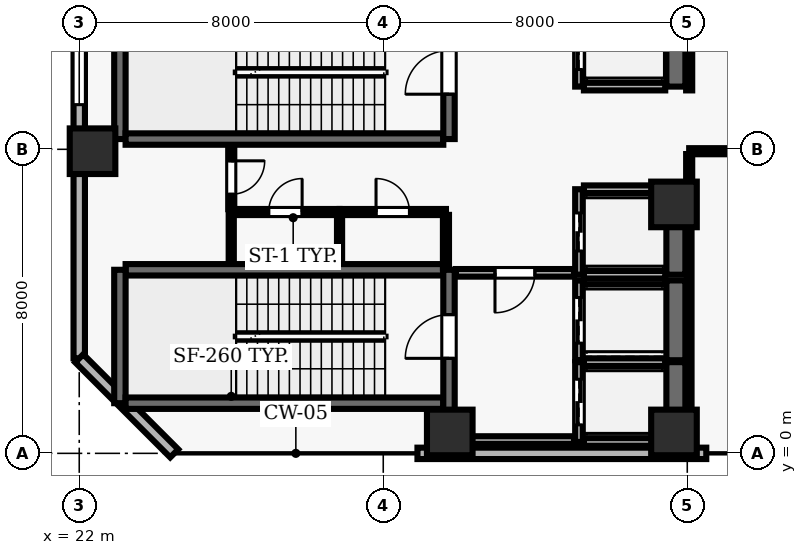
"""IFC4 building model, lengths in metres.
Left out: names, types, materials, properties, quantities, classifications, styles, units other than length and angle.
Written with IfcOpenShell. Run it as: python <this file> out.ifc"""

import sys

from ifc_helpers import new_model, si_unit, direction, frame, frame_2d, origin, origin_2d, place, context, subcontext, project, spatial, rectangle, extrude, element, fill, save


model = new_model("IFC4")
c1 = context("Model", 3, precision=1e-05, world=origin(), true_north=direction((0.0, 1.0)))
c2 = subcontext(c1, "Body", "Model", "MODEL_VIEW")
j1 = project(units=[si_unit("LENGTHUNIT", "METRE"), si_unit("PLANEANGLEUNIT", "RADIAN")], contexts=[c1])
p1 = place(None, origin())
s1 = spatial("IfcSite", under=j1, at=p1, CompositionType="ELEMENT")
p2 = place(p1, origin())
s2 = spatial("IfcBuilding", under=s1, at=p2, CompositionType="ELEMENT")
p3 = place(p2, frame((0.0, 0.0, 98.4)))
s3 = spatial("IfcBuildingStorey", under=s2, at=p3, CompositionType="ELEMENT", Elevation=98.4)
for number, where, z_axis, x_axis in (
    (1, (31.75, 0.55, 0.0), (0.0, 0.0, 1.0), (1.0, 0.0, 0.0)),
    (2, (37.65, 0.55, 0.0), (0.0, 0.0, 1.0), (1.0, 0.0, 0.0)),
    (3, (22.35, 7.95, 0.0), (0.0, 0.0, 1.0), (1.0, 0.0, 0.0)),
    (4, (37.65, 6.55, 0.0), (0.0, 0.0, 1.0), (1.0, 0.0, 0.0)),
):
    element("IfcColumn", number, at=place(p3, frame(where, z_axis=z_axis, x_axis=x_axis)), inside=s3, PredefinedType="COLUMN", context=c2, shape_type="SweptSolid", body=[
        extrude(rectangle(XDim=1.2, YDim=1.2, at=origin_2d()), origin(), (0.0, 0.0, 1.0), 5.0),
    ])
p4 = place(p3, frame((30.9, 0.0, 0.0), z_axis=(0.0, 0.0, 1.0), x_axis=(1.0, 0.0, 0.0)))
e5 = element("IfcWall", 5, at=p4, inside=s3, PredefinedType="SOLIDWALL", context=c2, shape_type="SweptSolid", body=[
    extrude(rectangle(XDim=7.6, YDim=0.3, at=frame_2d((3.8, 0.0))), origin(), (0.0, 0.0, 1.0), 4.79),
])
p5 = place(p3, frame((22.0, 46.1, 0.0), z_axis=(0.0, 0.0, 1.0), x_axis=(0.0, -1.0, 0.0)))
e6 = element("IfcWall", 6, at=p5, inside=s3, PredefinedType="SOLIDWALL", context=c2, shape_type="SweptSolid", body=[
    extrude(rectangle(XDim=43.6, YDim=0.3, at=frame_2d((21.8, 0.0))), origin(), (0.0, 0.0, 1.0), 4.79),
])
p6 = place(p5, frame((12.7, 0.0, 0.0)))
e7 = element("IfcOpeningElement", 7, at=p6, cuts=e6, PredefinedType="OPENING", context=c2, shape_type="SweptSolid", body=[
    extrude(rectangle(XDim=1.0, YDim=2.2, at=frame_2d((0.5, 1.1))), frame((0.0, 0.16, 0.0), z_axis=(0.0, -1.0, 0.0), x_axis=(1.0, 0.0, 0.0)), (0.0, 0.0, 1.0), 0.32),
])
p7 = place(p5, frame((1.225, 0.0, 0.9)))
e8 = element("IfcOpeningElement", 8, at=p7, cuts=e6, PredefinedType="OPENING", context=c2, shape_type="SweptSolid", body=[
    extrude(rectangle(XDim=3.0, YDim=2.2, at=frame_2d((1.5, 1.1))), frame((0.0, 0.16, 0.0), z_axis=(0.0, -1.0, 0.0), x_axis=(1.0, 0.0, 0.0)), (0.0, 0.0, 1.0), 0.32),
])
p8 = place(p5, frame((6.675, 0.0, 0.9)))
e9 = element("IfcOpeningElement", 9, at=p8, cuts=e6, PredefinedType="OPENING", context=c2, shape_type="SweptSolid", body=[
    extrude(rectangle(XDim=3.0, YDim=2.2, at=frame_2d((1.5, 1.1))), frame((0.0, 0.16, 0.0), z_axis=(0.0, -1.0, 0.0), x_axis=(1.0, 0.0, 0.0)), (0.0, 0.0, 1.0), 0.32),
])
p9 = place(p5, frame((23.475, 0.0, 0.9)))
e10 = element("IfcOpeningElement", 10, at=p9, cuts=e6, PredefinedType="OPENING", context=c2, shape_type="SweptSolid", body=[
    extrude(rectangle(XDim=3.0, YDim=2.2, at=frame_2d((1.5, 1.1))), frame((0.0, 0.16, 0.0), z_axis=(0.0, -1.0, 0.0), x_axis=(1.0, 0.0, 0.0)), (0.0, 0.0, 1.0), 0.32),
])
p10 = place(p5, frame((33.925, 0.0, 0.9)))
e11 = element("IfcOpeningElement", 11, at=p10, cuts=e6, PredefinedType="OPENING", context=c2, shape_type="SweptSolid", body=[
    extrude(rectangle(XDim=3.0, YDim=2.2, at=frame_2d((1.5, 1.1))), frame((0.0, 0.16, 0.0), z_axis=(0.0, -1.0, 0.0), x_axis=(1.0, 0.0, 0.0)), (0.0, 0.0, 1.0), 0.32),
])
p11 = place(p3, frame((22.0, 2.5, 0.0), z_axis=(0.0, 0.0, 1.0), x_axis=(0.707106781187, -0.707106781187, 0.0)))
e12 = element("IfcWall", 12, at=p11, inside=s3, PredefinedType="SOLIDWALL", context=c2, shape_type="SweptSolid", body=[
    extrude(rectangle(XDim=3.536, YDim=0.3, at=frame_2d((1.768, 0.0))), origin(), (0.0, 0.0, 1.0), 4.79),
])
p12 = place(p3, frame((31.58, 4.83, 0.0), z_axis=(0.0, 0.0, 1.0), x_axis=(-1.0, 0.0, 0.0)))
e13 = element("IfcWall", 13, at=p12, inside=s3, PredefinedType="SHEAR", context=c2, shape_type="SweptSolid", body=[
    extrude(rectangle(XDim=8.36, YDim=0.3, at=frame_2d((4.18, 0.0))), origin(), (0.0, 0.0, 1.0), 4.79),
])
p13 = place(p3, frame((23.07, 4.83, 0.0), z_axis=(0.0, 0.0, 1.0), x_axis=(0.0, -1.0, 0.0)))
e14 = element("IfcWall", 14, at=p13, inside=s3, PredefinedType="SHEAR", context=c2, shape_type="SweptSolid", body=[
    extrude(rectangle(XDim=3.51, YDim=0.3, at=frame_2d((1.755, 0.0))), origin(), (0.0, 0.0, 1.0), 4.79),
])
p14 = place(p3, frame((23.22, 1.32, 0.0), z_axis=(0.0, 0.0, 1.0), x_axis=(1.0, 0.0, 0.0)))
e15 = element("IfcWall", 15, at=p14, inside=s3, PredefinedType="SHEAR", context=c2, shape_type="SweptSolid", body=[
    extrude(rectangle(XDim=8.36, YDim=0.3, at=frame_2d((4.18, 0.0))), origin(), (0.0, 0.0, 1.0), 4.79),
])
p15 = place(p3, frame((31.73, 0.96, 0.0), z_axis=(0.0, 0.0, 1.0), x_axis=(0.0, 1.0, 0.0)))
e16 = element("IfcWall", 16, at=p15, inside=s3, PredefinedType="SHEAR", context=c2, shape_type="SweptSolid", body=[
    extrude(rectangle(XDim=3.87, YDim=0.3, at=frame_2d((1.935, 0.0))), origin(), (0.0, 0.0, 1.0), 4.79),
])
p16 = place(p15, frame((1.54, 0.0, 0.0)))
e17 = element("IfcOpeningElement", 17, at=p16, cuts=e16, PredefinedType="OPENING", context=c2, shape_type="SweptSolid", body=[
    extrude(rectangle(XDim=1.15, YDim=2.15, at=frame_2d((0.575, 1.075))), frame((0.0, 0.16, 0.0), z_axis=(0.0, -1.0, 0.0), x_axis=(1.0, 0.0, 0.0)), (0.0, 0.0, 1.0), 0.32),
])
p17 = place(p3, frame((23.07, 11.78, 0.0), z_axis=(0.0, 0.0, 1.0), x_axis=(0.0, -1.0, 0.0)))
e18 = element("IfcWall", 18, at=p17, inside=s3, PredefinedType="SHEAR", context=c2, shape_type="SweptSolid", body=[
    extrude(rectangle(XDim=3.51, YDim=0.3, at=frame_2d((1.755, 0.0))), origin(), (0.0, 0.0, 1.0), 4.79),
])
p18 = place(p3, frame((23.22, 8.27, 0.0), z_axis=(0.0, 0.0, 1.0), x_axis=(1.0, 0.0, 0.0)))
e19 = element("IfcWall", 19, at=p18, inside=s3, PredefinedType="SHEAR", context=c2, shape_type="SweptSolid", body=[
    extrude(rectangle(XDim=8.36, YDim=0.3, at=frame_2d((4.18, 0.0))), origin(), (0.0, 0.0, 1.0), 4.79),
])
p19 = place(p3, frame((31.73, 8.27, 0.0), z_axis=(0.0, 0.0, 1.0), x_axis=(0.0, 1.0, 0.0)))
e20 = element("IfcWall", 20, at=p19, inside=s3, PredefinedType="SHEAR", context=c2, shape_type="SweptSolid", body=[
    extrude(rectangle(XDim=3.51, YDim=0.3, at=frame_2d((1.755, 0.0))), origin(), (0.0, 0.0, 1.0), 4.79),
])
p20 = place(p19, frame((1.18, 0.0, 0.0)))
e21 = element("IfcOpeningElement", 21, at=p20, cuts=e20, PredefinedType="OPENING", context=c2, shape_type="SweptSolid", body=[
    extrude(rectangle(XDim=1.15, YDim=2.15, at=frame_2d((0.575, 1.075))), frame((0.0, 0.16, 0.0), z_axis=(0.0, -1.0, 0.0), x_axis=(1.0, 0.0, 0.0)), (0.0, 0.0, 1.0), 0.32),
])
p21 = place(p3, frame((35.15, 2.4, 0.0), z_axis=(0.0, 0.0, 1.0), x_axis=(0.0, -1.0, 0.0)))
e22 = element("IfcWall", 22, at=p21, inside=s3, PredefinedType="SOLIDWALL", context=c2, shape_type="SweptSolid", body=[
    extrude(rectangle(XDim=2.1, YDim=0.2, at=frame_2d((1.05, 0.0))), origin(), (0.0, 0.0, 1.0), 4.79),
])
p22 = place(p21, frame((0.45, 0.0, 0.0)))
e23 = element("IfcOpeningElement", 23, at=p22, cuts=e22, PredefinedType="OPENING", context=c2, shape_type="SweptSolid", body=[
    extrude(rectangle(XDim=1.2, YDim=2.15, at=frame_2d((0.6, 1.075))), frame((0.0, 0.11, 0.0), z_axis=(0.0, -1.0, 0.0), x_axis=(1.0, 0.0, 0.0)), (0.0, 0.0, 1.0), 0.22),
])
p23 = place(p3, frame((37.7, 0.3, 0.0), z_axis=(0.0, 0.0, 1.0), x_axis=(0.0, 1.0, 0.0)))
e24 = element("IfcWall", 24, at=p23, inside=s3, PredefinedType="SHEAR", context=c2, shape_type="SweptSolid", body=[
    extrude(rectangle(XDim=2.1, YDim=0.5, at=frame_2d((1.05, 0.0))), origin(), (0.0, 0.0, 1.0), 4.79),
])
for number, where, z_axis, x_axis in (
    (25, (35.28, 0.3, 0.0), (0.0, 0.0, 1.0), (1.0, 0.0, 0.0)),
    (26, (37.42, 2.4, 0.0), (0.0, 0.0, 1.0), (-1.0, 0.0, 0.0)),
):
    element("IfcWall", number, at=place(p3, frame(where, z_axis=z_axis, x_axis=x_axis)), inside=s3, PredefinedType="SOLIDWALL", context=c2, shape_type="SweptSolid", body=[
        extrude(rectangle(XDim=2.14, YDim=0.2, at=frame_2d((1.07, 0.0))), origin(), (0.0, 0.0, 1.0), 4.79),
    ])
p24 = place(p3, frame((35.15, 4.55, 0.0), z_axis=(0.0, 0.0, 1.0), x_axis=(0.0, -1.0, 0.0)))
e27 = element("IfcWall", 27, at=p24, inside=s3, PredefinedType="SOLIDWALL", context=c2, shape_type="SweptSolid", body=[
    extrude(rectangle(XDim=2.1, YDim=0.2, at=frame_2d((1.05, 0.0))), origin(), (0.0, 0.0, 1.0), 4.79),
])
p25 = place(p24, frame((0.45, 0.0, 0.0)))
e28 = element("IfcOpeningElement", 28, at=p25, cuts=e27, PredefinedType="OPENING", context=c2, shape_type="SweptSolid", body=[
    extrude(rectangle(XDim=1.2, YDim=2.15, at=frame_2d((0.6, 1.075))), frame((0.0, 0.11, 0.0), z_axis=(0.0, -1.0, 0.0), x_axis=(1.0, 0.0, 0.0)), (0.0, 0.0, 1.0), 0.22),
])
p26 = place(p3, frame((37.7, 2.45, 0.0), z_axis=(0.0, 0.0, 1.0), x_axis=(0.0, 1.0, 0.0)))
e29 = element("IfcWall", 29, at=p26, inside=s3, PredefinedType="SHEAR", context=c2, shape_type="SweptSolid", body=[
    extrude(rectangle(XDim=2.1, YDim=0.5, at=frame_2d((1.05, 0.0))), origin(), (0.0, 0.0, 1.0), 4.79),
])
p27 = place(p3, frame((37.42, 4.55, 0.0), z_axis=(0.0, 0.0, 1.0), x_axis=(-1.0, 0.0, 0.0)))
e30 = element("IfcWall", 30, at=p27, inside=s3, PredefinedType="SOLIDWALL", context=c2, shape_type="SweptSolid", body=[
    extrude(rectangle(XDim=2.14, YDim=0.2, at=frame_2d((1.07, 0.0))), origin(), (0.0, 0.0, 1.0), 4.79),
])
p28 = place(p3, frame((35.15, 6.95, 0.0), z_axis=(0.0, 0.0, 1.0), x_axis=(0.0, -1.0, 0.0)))
e31 = element("IfcWall", 31, at=p28, inside=s3, PredefinedType="SOLIDWALL", context=c2, shape_type="SweptSolid", body=[
    extrude(rectangle(XDim=2.25, YDim=0.2, at=frame_2d((1.125, 0.0))), origin(), (0.0, 0.0, 1.0), 4.79),
])
p29 = place(p28, frame((0.625, 0.0, 0.0)))
e32 = element("IfcOpeningElement", 32, at=p29, cuts=e31, PredefinedType="OPENING", context=c2, shape_type="SweptSolid", body=[
    extrude(rectangle(XDim=1.0, YDim=2.1, at=frame_2d((0.5, 1.05))), frame((0.0, 0.11, 0.0), z_axis=(0.0, -1.0, 0.0), x_axis=(1.0, 0.0, 0.0)), (0.0, 0.0, 1.0), 0.22),
])
p30 = place(p3, frame((37.7, 4.7, 0.0), z_axis=(0.0, 0.0, 1.0), x_axis=(0.0, 1.0, 0.0)))
e33 = element("IfcWall", 33, at=p30, inside=s3, PredefinedType="SHEAR", context=c2, shape_type="SweptSolid", body=[
    extrude(rectangle(XDim=2.25, YDim=0.5, at=frame_2d((1.125, 0.0))), origin(), (0.0, 0.0, 1.0), 4.79),
])
for number, where, z_axis, x_axis in (
    (34, (35.28, 4.7, 0.0), (0.0, 0.0, 1.0), (1.0, 0.0, 0.0)),
    (35, (37.42, 6.95, 0.0), (0.0, 0.0, 1.0), (-1.0, 0.0, 0.0)),
):
    element("IfcWall", number, at=place(p3, frame(where, z_axis=z_axis, x_axis=x_axis)), inside=s3, PredefinedType="SOLIDWALL", context=c2, shape_type="SweptSolid", body=[
        extrude(rectangle(XDim=2.14, YDim=0.2, at=frame_2d((1.07, 0.0))), origin(), (0.0, 0.0, 1.0), 4.79),
    ])
p31 = place(p3, frame((35.15, 11.55, 0.0), z_axis=(0.0, 0.0, 1.0), x_axis=(0.0, -1.0, 0.0)))
e36 = element("IfcWall", 36, at=p31, inside=s3, PredefinedType="SOLIDWALL", context=c2, shape_type="SweptSolid", body=[
    extrude(rectangle(XDim=1.9, YDim=0.2, at=frame_2d((0.95, 0.0))), origin(), (0.0, 0.0, 1.0), 4.79),
])
p32 = place(p31, frame((0.45, 0.0, 0.0)))
e37 = element("IfcOpeningElement", 37, at=p32, cuts=e36, PredefinedType="OPENING", context=c2, shape_type="SweptSolid", body=[
    extrude(rectangle(XDim=1.0, YDim=2.1, at=frame_2d((0.5, 1.05))), frame((0.0, 0.11, 0.0), z_axis=(0.0, -1.0, 0.0), x_axis=(1.0, 0.0, 0.0)), (0.0, 0.0, 1.0), 0.22),
])
p33 = place(p3, frame((37.7, 9.65, 0.0), z_axis=(0.0, 0.0, 1.0), x_axis=(0.0, 1.0, 0.0)))
e38 = element("IfcWall", 38, at=p33, inside=s3, PredefinedType="SHEAR", context=c2, shape_type="SweptSolid", body=[
    extrude(rectangle(XDim=1.9, YDim=0.5, at=frame_2d((0.95, 0.0))), origin(), (0.0, 0.0, 1.0), 4.79),
])
p34 = place(p3, frame((35.28, 9.65, 0.0), z_axis=(0.0, 0.0, 1.0), x_axis=(1.0, 0.0, 0.0)))
e39 = element("IfcWall", 39, at=p34, inside=s3, PredefinedType="SOLIDWALL", context=c2, shape_type="SweptSolid", body=[
    extrude(rectangle(XDim=2.14, YDim=0.2, at=frame_2d((1.07, 0.0))), origin(), (0.0, 0.0, 1.0), 4.79),
])
p35 = place(p3, frame((26.0, 6.35, 0.0), z_axis=(0.0, 0.0, 1.0), x_axis=(1.0, 0.0, 0.0)))
e40 = element("IfcWall", 40, at=p35, inside=s3, PredefinedType="PARTITIONING", context=c2, shape_type="SweptSolid", body=[
    extrude(rectangle(XDim=2.85, YDim=0.16, at=frame_2d((1.425, 0.0))), origin(), (0.0, 0.0, 1.0), 4.79),
])
p36 = place(p35, frame((0.985, 0.0, 0.0)))
e41 = element("IfcOpeningElement", 41, at=p36, cuts=e40, PredefinedType="OPENING", context=c2, shape_type="SweptSolid", body=[
    extrude(rectangle(XDim=0.88, YDim=2.1, at=frame_2d((0.44, 1.05))), frame((0.0, 0.09, 0.0), z_axis=(0.0, -1.0, 0.0), x_axis=(1.0, 0.0, 0.0)), (0.0, 0.0, 1.0), 0.18),
])
p37 = place(p3, frame((28.85, 6.35, 0.0), z_axis=(0.0, 0.0, 1.0), x_axis=(1.0, 0.0, 0.0)))
e42 = element("IfcWall", 42, at=p37, inside=s3, PredefinedType="PARTITIONING", context=c2, shape_type="SweptSolid", body=[
    extrude(rectangle(XDim=2.8, YDim=0.16, at=frame_2d((1.4, 0.0))), origin(), (0.0, 0.0, 1.0), 4.79),
])
p38 = place(p37, frame((0.96, 0.0, 0.0)))
e43 = element("IfcOpeningElement", 43, at=p38, cuts=e42, PredefinedType="OPENING", context=c2, shape_type="SweptSolid", body=[
    extrude(rectangle(XDim=0.88, YDim=2.1, at=frame_2d((0.44, 1.05))), frame((0.0, 0.09, 0.0), z_axis=(0.0, -1.0, 0.0), x_axis=(1.0, 0.0, 0.0)), (0.0, 0.0, 1.0), 0.18),
])
p39 = place(p3, frame((31.65, 0.35, 0.0), z_axis=(0.0, 0.0, 1.0), x_axis=(1.0, 0.0, 0.0)))
e44 = element("IfcWall", 44, at=p39, inside=s3, PredefinedType="SOLIDWALL", context=c2, shape_type="SweptSolid", body=[
    extrude(rectangle(XDim=3.37, YDim=0.2, at=frame_2d((1.685, 0.0))), origin(), (0.0, 0.0, 1.0), 4.79),
])
p40 = place(p3, frame((35.02, 4.75, 0.0), z_axis=(0.0, 0.0, 1.0), x_axis=(-1.0, 0.0, 0.0)))
e45 = element("IfcWall", 45, at=p40, inside=s3, PredefinedType="SOLIDWALL", context=c2, shape_type="SweptSolid", body=[
    extrude(rectangle(XDim=3.11, YDim=0.2, at=frame_2d((1.555, 0.0))), origin(), (0.0, 0.0, 1.0), 4.79),
])
p41 = place(p40, frame((1.03, 0.0, 0.0)))
e46 = element("IfcOpeningElement", 46, at=p41, cuts=e45, PredefinedType="OPENING", context=c2, shape_type="SweptSolid", body=[
    extrude(rectangle(XDim=1.05, YDim=2.15, at=frame_2d((0.525, 1.075))), frame((0.0, 0.11, 0.0), z_axis=(0.0, -1.0, 0.0), x_axis=(1.0, 0.0, 0.0)), (0.0, 0.0, 1.0), 0.22),
])
p42 = place(p3, frame((38.05, 7.95, 0.0), z_axis=(0.0, 0.0, 1.0), x_axis=(1.0, 0.0, 0.0)))
e47 = element("IfcWall", 47, at=p42, inside=s3, PredefinedType="PARTITIONING", context=c2, shape_type="SweptSolid", body=[
    extrude(rectangle(XDim=7.95, YDim=0.16, at=frame_2d((3.975, 0.0))), origin(), (0.0, 0.0, 1.0), 4.173),
])
p43 = place(p42, frame((3.525, 0.0, 0.0)))
e48 = element("IfcOpeningElement", 48, at=p43, cuts=e47, PredefinedType="OPENING", context=c2, shape_type="SweptSolid", body=[
    extrude(rectangle(XDim=0.9, YDim=2.1, at=frame_2d((0.45, 1.05))), frame((0.0, 0.09, 0.0), z_axis=(0.0, -1.0, 0.0), x_axis=(1.0, 0.0, 0.0)), (0.0, 0.0, 1.0), 0.18),
])
p44 = place(p3, frame((26.0, 5.01, 0.0), z_axis=(0.0, 0.0, 1.0), x_axis=(0.0, 1.0, 0.0)))
e49 = element("IfcWall", 49, at=p44, inside=s3, PredefinedType="PARTITIONING", context=c2, shape_type="SweptSolid", body=[
    extrude(rectangle(XDim=1.265, YDim=0.135, at=frame_2d((0.632, 0.0))), origin(), (0.0, 0.0, 1.0), 4.79),
])
p45 = place(p3, frame((26.0, 8.09, 0.0), z_axis=(0.0, 0.0, 1.0), x_axis=(0.0, -1.0, 0.0)))
e50 = element("IfcWall", 50, at=p45, inside=s3, PredefinedType="PARTITIONING", context=c2, shape_type="SweptSolid", body=[
    extrude(rectangle(XDim=1.665, YDim=0.16, at=frame_2d((0.833, 0.0))), origin(), (0.0, 0.0, 1.0), 4.79),
])
p46 = place(p45, frame((0.393, 0.0, 0.0)))
e51 = element("IfcOpeningElement", 51, at=p46, cuts=e50, PredefinedType="OPENING", context=c2, shape_type="SweptSolid", body=[
    extrude(rectangle(XDim=0.88, YDim=2.1, at=frame_2d((0.44, 1.05))), frame((0.0, 0.09, 0.0), z_axis=(0.0, -1.0, 0.0), x_axis=(1.0, 0.0, 0.0)), (0.0, 0.0, 1.0), 0.18),
])
p47 = place(p3, frame((28.85, 5.01, 0.0), z_axis=(0.0, 0.0, 1.0), x_axis=(0.0, 1.0, 0.0)))
e52 = element("IfcWall", 52, at=p47, inside=s3, PredefinedType="PARTITIONING", context=c2, shape_type="SweptSolid", body=[
    extrude(rectangle(XDim=1.265, YDim=0.135, at=frame_2d((0.632, 0.0))), origin(), (0.0, 0.0, 1.0), 4.79),
])
p48 = place(p3, frame((31.65, 4.86, 0.0), z_axis=(0.0, 0.0, 1.0), x_axis=(0.0, 1.0, 0.0)))
e53 = element("IfcWall", 53, at=p48, inside=s3, PredefinedType="PARTITIONING", context=c2, shape_type="SweptSolid", body=[
    extrude(rectangle(XDim=1.415, YDim=0.16, at=frame_2d((0.708, 0.0))), origin(), (0.0, 0.0, 1.0), 4.79),
])
p49 = place(p3, frame((38.05, 7.05, 0.0), z_axis=(0.0, 0.0, 1.0), x_axis=(0.0, 1.0, 0.0)))
e54 = element("IfcWall", 54, at=p49, inside=s3, PredefinedType="PARTITIONING", context=c2, shape_type="SweptSolid", body=[
    extrude(rectangle(XDim=0.825, YDim=0.16, at=frame_2d((0.413, 0.0))), origin(), (0.0, 0.0, 1.0), 4.173),
])
p50 = place(p3, frame((38.05, 7.05, 0.0), z_axis=(0.0, 0.0, 1.0), x_axis=(0.0, -1.0, 0.0)))
e55 = element("IfcWall", 55, at=p50, inside=s3, PredefinedType="PARTITIONING", context=c2, shape_type="SweptSolid", body=[
    extrude(rectangle(XDim=6.905, YDim=0.125, at=frame_2d((3.453, 0.0))), origin(), (0.0, 0.0, 1.0), 4.173),
])
p51 = place(p3, frame((38.05, 15.925, 0.0), z_axis=(0.0, 0.0, 1.0), x_axis=(0.0, -1.0, 0.0)))
e56 = element("IfcWall", 56, at=p51, inside=s3, PredefinedType="PARTITIONING", context=c2, shape_type="SweptSolid", body=[
    extrude(rectangle(XDim=6.375, YDim=0.16, at=frame_2d((3.188, 0.0))), origin(), (0.0, 0.0, 1.0), 4.173),
])
p52 = place(p10, origin())
e57 = element("IfcWindow", 57, at=p52, inside=s3, PartitioningType="SINGLE_PANEL", PredefinedType="WINDOW", context=c2, shape_type="SweptSolid", body=[
    extrude(rectangle(XDim=3.0, YDim=2.2, at=frame_2d((1.5, 1.1))), frame((0.0, 0.03, 0.0), z_axis=(0.0, -1.0, 0.0), x_axis=(1.0, 0.0, 0.0)), (0.0, 0.0, 1.0), 0.06),
])
fill(e11, e57)
p53 = place(p16, origin())
e58 = element("IfcDoor", 58, at=p53, inside=s3, OperationType="SINGLE_SWING_LEFT", PredefinedType="DOOR", context=c2, shape_type="SweptSolid", body=[
    extrude(rectangle(XDim=1.15, YDim=2.15, at=frame_2d((0.575, 1.075))), frame((0.0, 0.025, 0.0), z_axis=(0.0, -1.0, 0.0), x_axis=(1.0, 0.0, 0.0)), (0.0, 0.0, 1.0), 0.05),
])
fill(e17, e58)
p54 = place(p20, origin())
e59 = element("IfcDoor", 59, at=p54, inside=s3, OperationType="SINGLE_SWING_LEFT", PredefinedType="DOOR", context=c2, shape_type="SweptSolid", body=[
    extrude(rectangle(XDim=1.15, YDim=2.15, at=frame_2d((0.575, 1.075))), frame((0.0, 0.025, 0.0), z_axis=(0.0, -1.0, 0.0), x_axis=(1.0, 0.0, 0.0)), (0.0, 0.0, 1.0), 0.05),
])
fill(e21, e59)
p55 = place(p22, origin())
e60 = element("IfcDoor", 60, at=p55, inside=s3, OperationType="DOUBLE_DOOR_SLIDING", PredefinedType="DOOR", context=c2, shape_type="SweptSolid", body=[
    extrude(rectangle(XDim=1.2, YDim=2.15, at=frame_2d((0.6, 1.075))), frame((0.0, 0.025, 0.0), z_axis=(0.0, -1.0, 0.0), x_axis=(1.0, 0.0, 0.0)), (0.0, 0.0, 1.0), 0.05),
])
fill(e23, e60)
p56 = place(p25, origin())
e61 = element("IfcDoor", 61, at=p56, inside=s3, OperationType="DOUBLE_DOOR_SLIDING", PredefinedType="DOOR", context=c2, shape_type="SweptSolid", body=[
    extrude(rectangle(XDim=1.2, YDim=2.15, at=frame_2d((0.6, 1.075))), frame((0.0, 0.025, 0.0), z_axis=(0.0, -1.0, 0.0), x_axis=(1.0, 0.0, 0.0)), (0.0, 0.0, 1.0), 0.05),
])
fill(e28, e61)
p57 = place(p29, origin())
e62 = element("IfcDoor", 62, at=p57, inside=s3, OperationType="DOUBLE_DOOR_SLIDING", PredefinedType="DOOR", context=c2, shape_type="SweptSolid", body=[
    extrude(rectangle(XDim=1.0, YDim=2.1, at=frame_2d((0.5, 1.05))), frame((0.0, 0.025, 0.0), z_axis=(0.0, -1.0, 0.0), x_axis=(1.0, 0.0, 0.0)), (0.0, 0.0, 1.0), 0.05),
])
fill(e32, e62)
p58 = place(p32, origin())
e63 = element("IfcDoor", 63, at=p58, inside=s3, OperationType="DOUBLE_DOOR_SLIDING", PredefinedType="DOOR", context=c2, shape_type="SweptSolid", body=[
    extrude(rectangle(XDim=1.0, YDim=2.1, at=frame_2d((0.5, 1.05))), frame((0.0, 0.025, 0.0), z_axis=(0.0, -1.0, 0.0), x_axis=(1.0, 0.0, 0.0)), (0.0, 0.0, 1.0), 0.05),
])
fill(e37, e63)
p59 = place(p41, origin())
e64 = element("IfcDoor", 64, at=p59, inside=s3, OperationType="SINGLE_SWING_RIGHT", PredefinedType="DOOR", context=c2, shape_type="SweptSolid", body=[
    extrude(rectangle(XDim=1.05, YDim=2.15, at=frame_2d((0.525, 1.075))), frame((0.0, 0.025, 0.0), z_axis=(0.0, -1.0, 0.0), x_axis=(1.0, 0.0, 0.0)), (0.0, 0.0, 1.0), 0.05),
])
fill(e46, e64)
p60 = place(p46, origin())
e65 = element("IfcDoor", 65, at=p60, inside=s3, OperationType="SINGLE_SWING_LEFT", PredefinedType="DOOR", context=c2, shape_type="SweptSolid", body=[
    extrude(rectangle(XDim=0.88, YDim=2.1, at=frame_2d((0.44, 1.05))), frame((0.0, 0.025, 0.0), z_axis=(0.0, -1.0, 0.0), x_axis=(1.0, 0.0, 0.0)), (0.0, 0.0, 1.0), 0.05),
])
fill(e51, e65)
p61 = place(p36, origin())
e66 = element("IfcDoor", 66, at=p61, inside=s3, OperationType="SINGLE_SWING_RIGHT", PredefinedType="DOOR", context=c2, shape_type="SweptSolid", body=[
    extrude(rectangle(XDim=0.88, YDim=2.1, at=frame_2d((0.44, 1.05))), frame((0.0, 0.025, 0.0), z_axis=(0.0, -1.0, 0.0), x_axis=(1.0, 0.0, 0.0)), (0.0, 0.0, 1.0), 0.05),
])
fill(e41, e66)
p62 = place(p38, origin())
e67 = element("IfcDoor", 67, at=p62, inside=s3, OperationType="SINGLE_SWING_LEFT", PredefinedType="DOOR", context=c2, shape_type="SweptSolid", body=[
    extrude(rectangle(XDim=0.88, YDim=2.1, at=frame_2d((0.44, 1.05))), frame((0.0, 0.025, 0.0), z_axis=(0.0, -1.0, 0.0), x_axis=(1.0, 0.0, 0.0)), (0.0, 0.0, 1.0), 0.05),
])
fill(e43, e67)
save(model, sys.argv[1])
